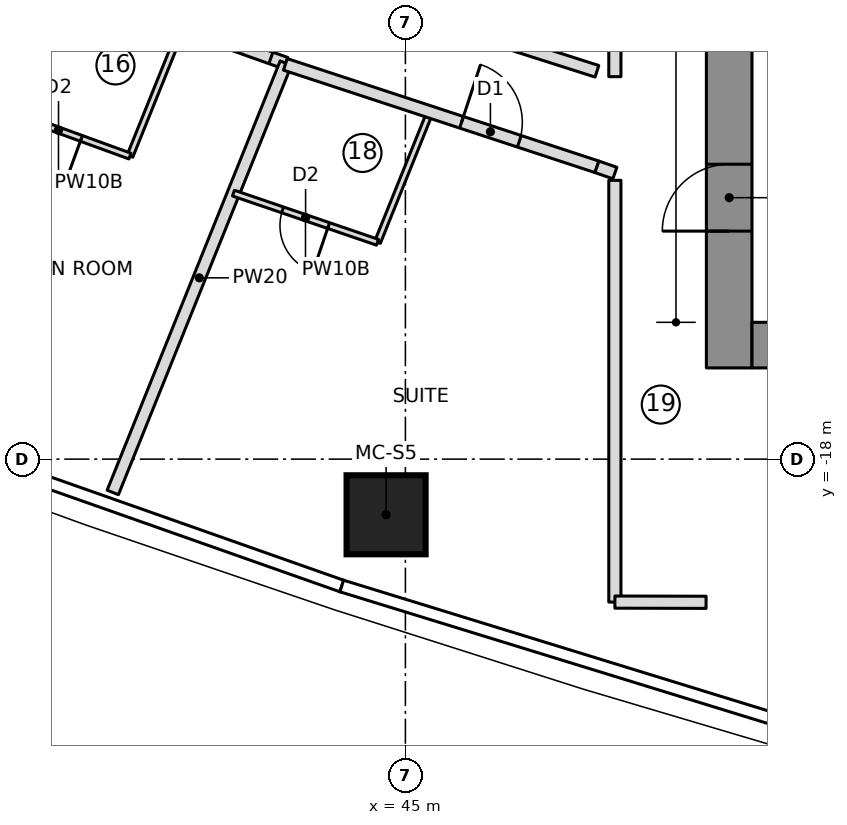
"""IFC4 building model, lengths in metres.
Left out: names, types, materials, properties, quantities, classifications, styles, units other than length and angle.
Written with IfcOpenShell. Run it as: python <this file> out.ifc"""

import sys

from ifc_helpers import new_model, si_unit, direction, frame, frame_2d, origin, origin_2d, place, context, subcontext, project, spatial, rectangle, extrude, element, fill, save


model = new_model("IFC4")
c1 = context("Model", 3, precision=1e-05, world=origin(), true_north=direction((0.0, 1.0)))
c2 = subcontext(c1, "Body", "Model", "MODEL_VIEW")
j1 = project(units=[si_unit("LENGTHUNIT", "METRE"), si_unit("PLANEANGLEUNIT", "RADIAN")], contexts=[c1])
p1 = place(None, origin())
s1 = spatial("IfcSite", under=j1, at=p1, CompositionType="ELEMENT")
p2 = place(p1, origin())
s2 = spatial("IfcBuilding", under=s1, at=p2, CompositionType="ELEMENT")
p3 = place(p2, frame((0.0, 0.0, 175.5)))
s3 = spatial("IfcBuildingStorey", under=s2, at=p3, CompositionType="ELEMENT", Elevation=175.5)
p4 = place(p3, frame((50.325, -16.5, 0.0), z_axis=(0.0, 0.0, 1.0), x_axis=(0.0, 1.0, 0.0)))
e1 = element("IfcWall", 1, at=p4, inside=s3, PredefinedType="SHEAR", context=c2, shape_type="SweptSolid", body=[
    extrude(rectangle(XDim=9.85, YDim=0.75, at=frame_2d((4.925, 0.0))), origin(), (0.0, 0.0, 1.0), 3.55),
])
p5 = place(p4, frame((2.25, 0.0, 0.0)))
e2 = element("IfcOpeningElement", 2, at=p5, cuts=e1, PredefinedType="OPENING", context=c2, shape_type="SweptSolid", body=[
    extrude(rectangle(XDim=1.1, YDim=2.1, at=frame_2d((0.55, 1.05))), frame((0.0, 0.385, 0.0), z_axis=(0.0, -1.0, 0.0), x_axis=(1.0, 0.0, 0.0)), (0.0, 0.0, 1.0), 0.77),
])
p6 = place(p3, frame((50.7, -16.125, 0.0), z_axis=(0.0, 0.0, 1.0), x_axis=(1.0, 0.0, 0.0)))
e3 = element("IfcWall", 3, at=p6, inside=s3, PredefinedType="SHEAR", context=c2, shape_type="SweptSolid", body=[
    extrude(rectangle(XDim=13.77, YDim=0.75, at=frame_2d((6.885, 0.0))), origin(), (0.0, 0.0, 1.0), 3.55),
])
p7 = place(p3, frame((44.683, -18.916, 0.0), z_axis=(0.0, 0.0, 1.0), x_axis=(1.0, 0.0, 0.0)))
e4 = element("IfcColumn", 4, at=p7, inside=s3, PredefinedType="COLUMN", context=c2, shape_type="SweptSolid", body=[
    extrude(rectangle(XDim=1.3, YDim=1.3, at=origin_2d()), origin(), (0.0, 0.0, 1.0), 3.55),
])
p8 = place(p3, frame((38.972, -10.045, 0.0), z_axis=(0.0, 0.0, 1.0), x_axis=(0.942220252757, -0.334994022773, 0.0)))
e5 = element("IfcWall", 5, at=p8, inside=s3, PredefinedType="PARTITIONING", context=c2, shape_type="SweptSolid", body=[
    extrude(rectangle(XDim=4.31, YDim=0.2, at=frame_2d((2.155, 0.0))), origin(), (0.0, 0.0, 1.0), 3.25),
])
p9 = place(p8, frame((3.05, 0.0, 0.0)))
e6 = element("IfcOpeningElement", 6, at=p9, cuts=e5, PredefinedType="OPENING", context=c2, shape_type="SweptSolid", body=[
    extrude(rectangle(XDim=1.0, YDim=2.1, at=frame_2d((0.5, 1.05))), frame((0.0, 0.11, 0.0), z_axis=(0.0, -1.0, 0.0), x_axis=(1.0, 0.0, 0.0)), (0.0, 0.0, 1.0), 0.22),
])
p10 = place(p3, frame((41.322, -10.903, 0.0), z_axis=(0.0, 0.0, 1.0), x_axis=(-0.373846436826, -0.927490615409, 0.0)))
e7 = element("IfcWall", 7, at=p10, inside=s3, PredefinedType="PARTITIONING", context=c2, shape_type="SweptSolid", body=[
    extrude(rectangle(XDim=2.279, YDim=0.1, at=frame_2d((1.139, 0.0))), origin(), (0.0, 0.0, 1.0), 3.25),
])
p11 = place(p3, frame((40.47, -13.016, 0.0), z_axis=(0.0, 0.0, 1.0), x_axis=(-0.939744972593, 0.341876273652, 0.0)))
e8 = element("IfcWall", 8, at=p11, inside=s3, PredefinedType="PARTITIONING", context=c2, shape_type="SweptSolid", body=[
    extrude(rectangle(XDim=2.501, YDim=0.1, at=frame_2d((1.251, 0.0))), origin(), (0.0, 0.0, 1.0), 3.25),
])
p12 = place(p11, frame((0.85, 0.0, 0.0)))
e9 = element("IfcOpeningElement", 9, at=p12, cuts=e8, PredefinedType="OPENING", context=c2, shape_type="SweptSolid", body=[
    extrude(rectangle(XDim=0.8, YDim=2.1, at=frame_2d((0.4, 1.05))), frame((0.0, 0.06, 0.0), z_axis=(0.0, -1.0, 0.0), x_axis=(1.0, 0.0, 0.0)), (0.0, 0.0, 1.0), 0.12),
])
p13 = place(p3, frame((40.188, -18.548, 0.0), z_axis=(0.0, 0.0, 1.0), x_axis=(0.373877998371, 0.927477893178, 0.0)))
e10 = element("IfcWall", 10, at=p13, inside=s3, PredefinedType="PARTITIONING", context=c2, shape_type="SweptSolid", body=[
    extrude(rectangle(XDim=7.611, YDim=0.2, at=frame_2d((3.806, 0.0))), origin(), (0.0, 0.0, 1.0), 3.25),
])
p14 = place(p3, frame((45.395, -12.318, 0.0), z_axis=(0.0, 0.0, 1.0), x_axis=(-0.373917841166, -0.927461831052, 0.0)))
e11 = element("IfcWall", 11, at=p14, inside=s3, PredefinedType="PARTITIONING", context=c2, shape_type="SweptSolid", body=[
    extrude(rectangle(XDim=2.281, YDim=0.1, at=frame_2d((1.14, 0.0))), origin(), (0.0, 0.0, 1.0), 3.25),
])
p15 = place(p3, frame((44.542, -14.434, 0.0), z_axis=(0.0, 0.0, 1.0), x_axis=(-0.946406575113, 0.322977699822, 0.0)))
e12 = element("IfcWall", 12, at=p15, inside=s3, PredefinedType="PARTITIONING", context=c2, shape_type="SweptSolid", body=[
    extrude(rectangle(XDim=2.504, YDim=0.1, at=frame_2d((1.252, 0.0))), origin(), (0.0, 0.0, 1.0), 3.25),
])
p16 = place(p15, frame((0.85, 0.0, 0.0)))
e13 = element("IfcOpeningElement", 13, at=p16, cuts=e12, PredefinedType="OPENING", context=c2, shape_type="SweptSolid", body=[
    extrude(rectangle(XDim=0.8, YDim=2.1, at=frame_2d((0.4, 1.05))), frame((0.0, 0.06, 0.0), z_axis=(0.0, -1.0, 0.0), x_axis=(1.0, 0.0, 0.0)), (0.0, 0.0, 1.0), 0.12),
])
p17 = place(p3, frame((46.881, -11.217, 0.0), z_axis=(0.0, 0.0, 1.0), x_axis=(-0.946436071896, 0.322891253852, 0.0)))
e14 = element("IfcWall", 14, at=p17, inside=s3, PredefinedType="PARTITIONING", context=c2, shape_type="SweptSolid", body=[
    extrude(rectangle(XDim=4.117, YDim=0.2, at=frame_2d((2.059, 0.0))), origin(), (0.0, 0.0, 1.0), 3.25),
])
p18 = place(p3, frame((43.026, -11.507, 0.0), z_axis=(0.0, 0.0, 1.0), x_axis=(0.949951949432, -0.312396052744, 0.0)))
e15 = element("IfcWall", 15, at=p18, inside=s3, PredefinedType="PARTITIONING", context=c2, shape_type="SweptSolid", body=[
    extrude(rectangle(XDim=5.394, YDim=0.2, at=frame_2d((2.697, 0.0))), origin(), (0.0, 0.0, 1.0), 3.25),
])
p19 = place(p18, frame((3.05, 0.0, 0.0)))
e16 = element("IfcOpeningElement", 16, at=p19, cuts=e15, PredefinedType="OPENING", context=c2, shape_type="SweptSolid", body=[
    extrude(rectangle(XDim=1.0, YDim=2.1, at=frame_2d((0.5, 1.05))), frame((0.0, 0.11, 0.0), z_axis=(0.0, -1.0, 0.0), x_axis=(1.0, 0.0, 0.0)), (0.0, 0.0, 1.0), 0.22),
])
p20 = place(p3, frame((48.15, -11.621, 0.0), z_axis=(0.0, 0.0, 1.0), x_axis=(-0.952761948983, 0.303718074157, 0.0)))
e17 = element("IfcWall", 17, at=p20, inside=s3, PredefinedType="PARTITIONING", context=c2, shape_type="SweptSolid", body=[
    extrude(rectangle(XDim=1.332, YDim=0.2, at=frame_2d((0.666, 0.0))), origin(), (0.0, 0.0, 1.0), 3.25),
])
p21 = place(p3, frame((48.445, 11.71, 0.0), z_axis=(0.0, 0.0, 1.0), x_axis=(0.0, -1.0, 0.0)))
e18 = element("IfcWall", 18, at=p21, inside=s3, PredefinedType="PARTITIONING", context=c2, shape_type="SweptSolid", body=[
    extrude(rectangle(XDim=23.42, YDim=0.2, at=frame_2d((11.71, 0.0))), origin(), (0.0, 0.0, 1.0), 3.25),
])
p22 = place(p3, frame((48.15, -13.192, 0.0), z_axis=(0.0, 0.0, 1.0), x_axis=(0.944623214561, -0.328156947987, 0.0)))
e19 = element("IfcWall", 19, at=p22, inside=s3, PredefinedType="PARTITIONING", context=c2, shape_type="SweptSolid", body=[
    extrude(rectangle(XDim=0.312, YDim=0.2, at=frame_2d((0.156, 0.0))), origin(), (0.0, 0.0, 1.0), 3.25),
])
p23 = place(p3, frame((48.445, -13.415, 0.0), z_axis=(0.0, 0.0, 1.0), x_axis=(3.5195157e-05, -0.999999999381, 0.0)))
e20 = element("IfcWall", 20, at=p23, inside=s3, PredefinedType="PARTITIONING", context=c2, shape_type="SweptSolid", body=[
    extrude(rectangle(XDim=6.937, YDim=0.2, at=frame_2d((3.468, 0.0))), origin(), (0.0, 0.0, 1.0), 3.25),
])
p24 = place(p3, frame((48.445, -20.352, 0.0), z_axis=(0.0, 0.0, 1.0), x_axis=(0.999997403051, -0.002279010849, 0.0)))
e21 = element("IfcWall", 21, at=p24, inside=s3, PredefinedType="PARTITIONING", context=c2, shape_type="SweptSolid", body=[
    extrude(rectangle(XDim=1.5, YDim=0.2, at=frame_2d((0.75, 0.0))), origin(), (0.0, 0.0, 1.0), 3.25),
])
p25 = place(p12, origin())
e22 = element("IfcDoor", 22, at=p25, inside=s3, OperationType="SINGLE_SWING_LEFT", PredefinedType="DOOR", context=c2, shape_type="SweptSolid", body=[
    extrude(rectangle(XDim=0.8, YDim=2.1, at=frame_2d((0.4, 1.05))), frame((0.0, 0.025, 0.0), z_axis=(0.0, -1.0, 0.0), x_axis=(1.0, 0.0, 0.0)), (0.0, 0.0, 1.0), 0.05),
])
fill(e9, e22)
p26 = place(p9, origin())
e23 = element("IfcDoor", 23, at=p26, inside=s3, OperationType="SINGLE_SWING_LEFT", PredefinedType="DOOR", context=c2, shape_type="SweptSolid", body=[
    extrude(rectangle(XDim=1.0, YDim=2.1, at=frame_2d((0.5, 1.05))), frame((0.0, 0.025, 0.0), z_axis=(0.0, -1.0, 0.0), x_axis=(1.0, 0.0, 0.0)), (0.0, 0.0, 1.0), 0.05),
])
fill(e6, e23)
p27 = place(p16, origin())
e24 = element("IfcDoor", 24, at=p27, inside=s3, OperationType="SINGLE_SWING_LEFT", PredefinedType="DOOR", context=c2, shape_type="SweptSolid", body=[
    extrude(rectangle(XDim=0.8, YDim=2.1, at=frame_2d((0.4, 1.05))), frame((0.0, 0.025, 0.0), z_axis=(0.0, -1.0, 0.0), x_axis=(1.0, 0.0, 0.0)), (0.0, 0.0, 1.0), 0.05),
])
fill(e13, e24)
p28 = place(p19, origin())
e25 = element("IfcDoor", 25, at=p28, inside=s3, OperationType="SINGLE_SWING_LEFT", PredefinedType="DOOR", context=c2, shape_type="SweptSolid", body=[
    extrude(rectangle(XDim=1.0, YDim=2.1, at=frame_2d((0.5, 1.05))), frame((0.0, 0.025, 0.0), z_axis=(0.0, -1.0, 0.0), x_axis=(1.0, 0.0, 0.0)), (0.0, 0.0, 1.0), 0.05),
])
fill(e16, e25)
p29 = place(p5, origin())
e26 = element("IfcDoor", 26, at=p29, inside=s3, OperationType="SINGLE_SWING_RIGHT", PredefinedType="DOOR", context=c2, shape_type="SweptSolid", body=[
    extrude(rectangle(XDim=1.1, YDim=2.1, at=frame_2d((0.55, 1.05))), frame((0.0, 0.025, 0.0), z_axis=(0.0, -1.0, 0.0), x_axis=(1.0, 0.0, 0.0)), (0.0, 0.0, 1.0), 0.05),
])
fill(e2, e26)
save(model, sys.argv[1])
